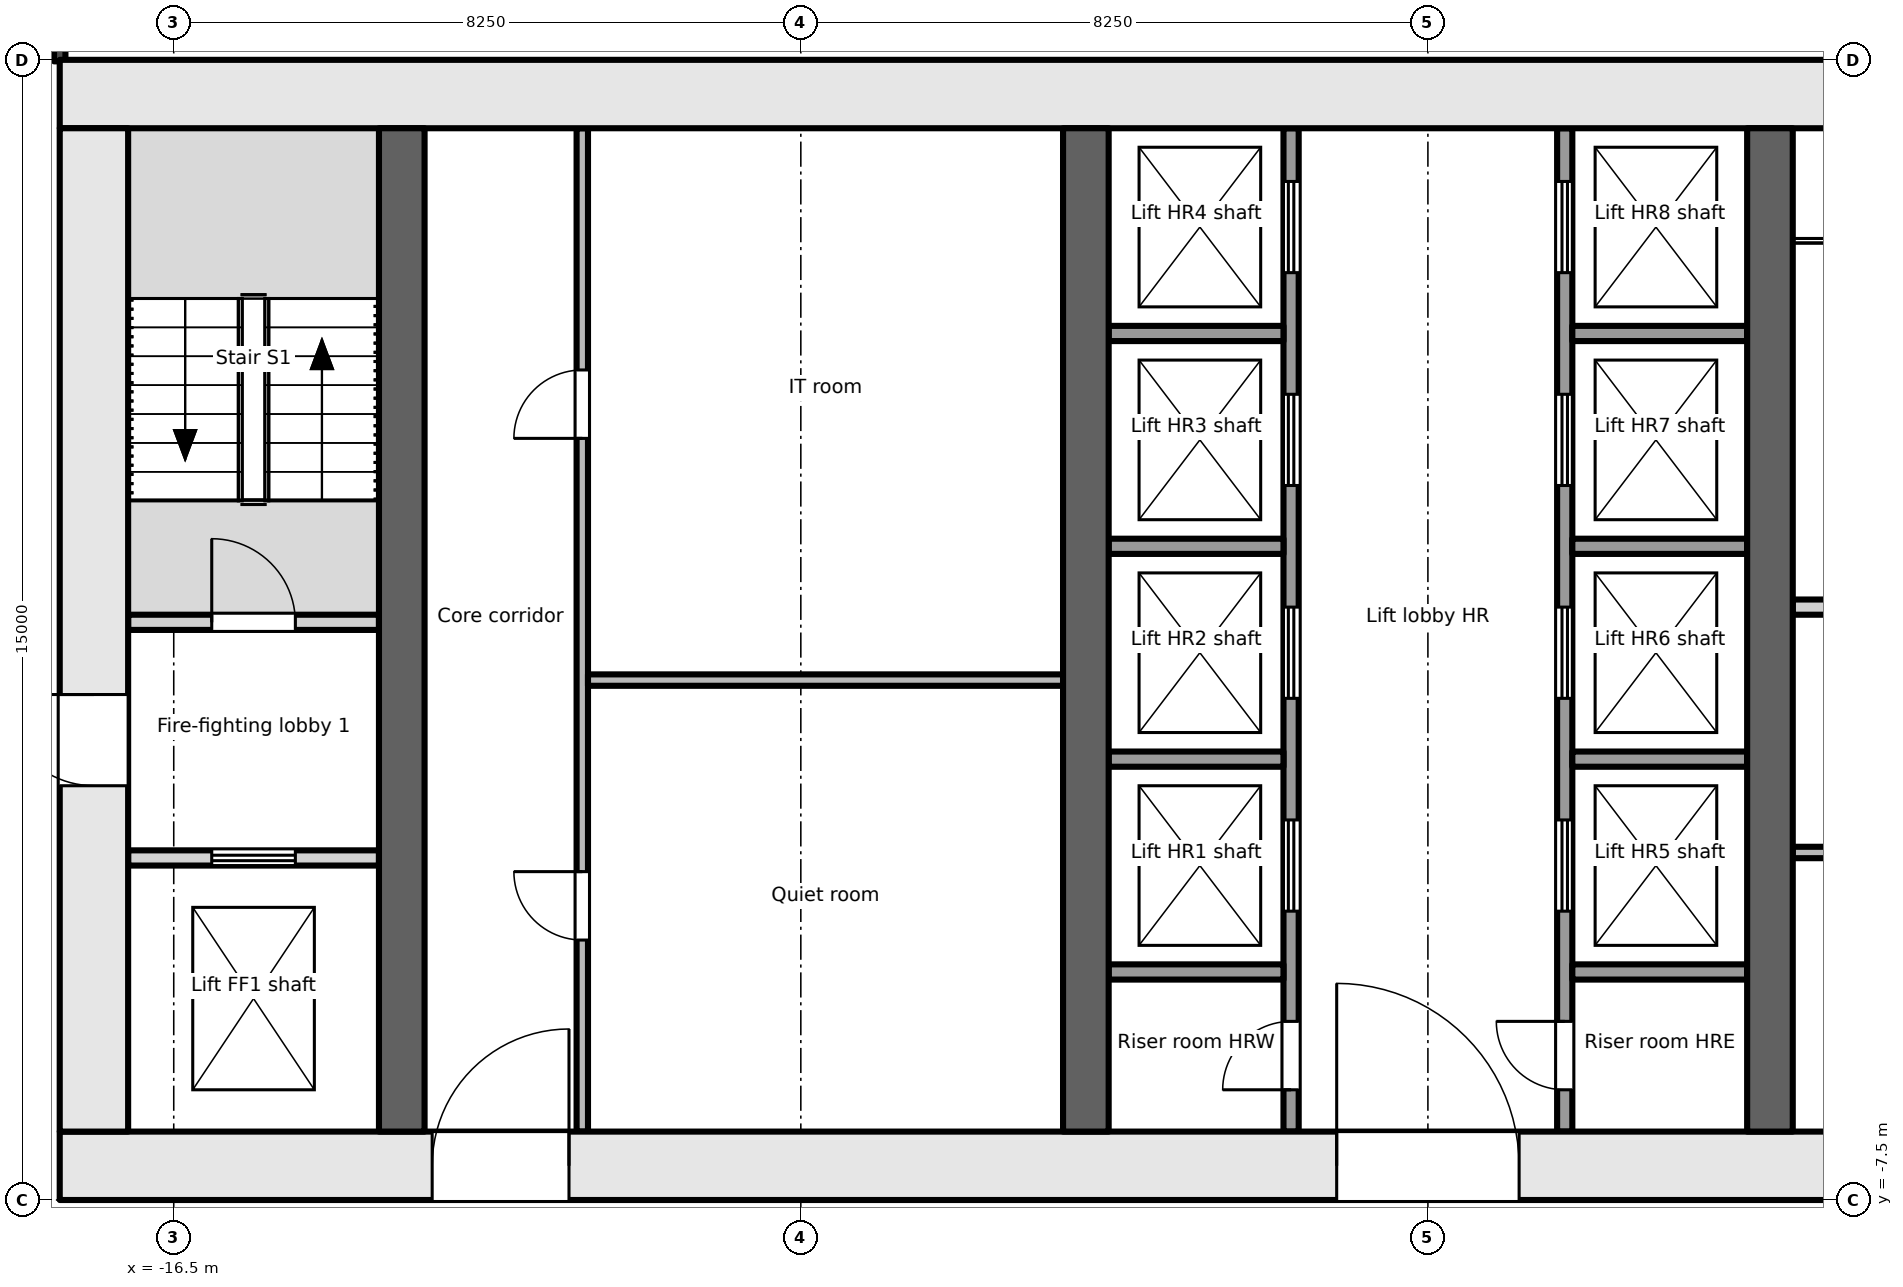
"""IFC4 building model, lengths in metres.
Left out: names, types, materials, properties, quantities, classifications, styles, units other than length and angle.
Written with IfcOpenShell. Run it as: python <this file> out.ifc"""

import sys

from ifc_helpers import new_model, si_unit, direction, frame, frame_2d, origin, place, context, subcontext, project, spatial, rectangle, extrude, element, fill, save


model = new_model("IFC4")
c1 = context("Model", 3, precision=1e-05, world=origin(), true_north=direction((0.0, 1.0)))
c2 = subcontext(c1, "Body", "Model", "MODEL_VIEW")
j1 = project(units=[si_unit("LENGTHUNIT", "METRE"), si_unit("PLANEANGLEUNIT", "RADIAN")], contexts=[c1])
p1 = place(None, origin())
s1 = spatial("IfcSite", under=j1, at=p1, CompositionType="ELEMENT")
p2 = place(p1, origin())
s2 = spatial("IfcBuilding", under=s1, at=p2, CompositionType="ELEMENT")
p3 = place(p2, frame((0.0, 0.0, 286.3)))
s3 = spatial("IfcBuildingStorey", under=s2, at=p3, CompositionType="ELEMENT", Elevation=286.3)
p4 = place(p3, frame((-18.0, -7.05, -0.2), z_axis=(0.0, 0.0, 1.0), x_axis=(1.0, 0.0, 0.0)))
e1 = element("IfcWall", 1, at=p4, inside=s3, PredefinedType="SHEAR", context=c2, shape_type="SweptSolid", body=[
    extrude(rectangle(XDim=36.0, YDim=0.9, at=frame_2d((18.0, 0.0))), origin(), (0.0, 0.0, 1.0), 6.0),
])
p5 = place(p4, frame((4.9, 0.0, 0.2)))
e2 = element("IfcOpeningElement", 2, at=p5, cuts=e1, PredefinedType="OPENING", context=c2, shape_type="SweptSolid", body=[
    extrude(rectangle(XDim=1.8, YDim=2.1, at=frame_2d((0.9, 1.05))), frame((0.0, 0.46, 0.0), z_axis=(0.0, -1.0, 0.0), x_axis=(1.0, 0.0, 0.0)), (0.0, 0.0, 1.0), 0.921),
])
p6 = place(p4, frame((16.8, 0.0, 0.2)))
e3 = element("IfcOpeningElement", 3, at=p6, cuts=e1, PredefinedType="OPENING", context=c2, shape_type="SweptSolid", body=[
    extrude(rectangle(XDim=2.4, YDim=2.1, at=frame_2d((1.2, 1.05))), frame((0.0, 0.46, 0.0), z_axis=(0.0, -1.0, 0.0), x_axis=(1.0, 0.0, 0.0)), (0.0, 0.0, 1.0), 0.921),
])
p7 = place(p4, frame((26.1, 0.0, 0.2)))
e4 = element("IfcOpeningElement", 4, at=p7, cuts=e1, PredefinedType="OPENING", context=c2, shape_type="SweptSolid", body=[
    extrude(rectangle(XDim=2.4, YDim=2.1, at=frame_2d((1.2, 1.05))), frame((0.0, 0.46, 0.0), z_axis=(0.0, -1.0, 0.0), x_axis=(1.0, 0.0, 0.0)), (0.0, 0.0, 1.0), 0.921),
])
p8 = place(p3, frame((-18.0, 7.05, -0.2), z_axis=(0.0, 0.0, 1.0), x_axis=(1.0, 0.0, 0.0)))
e5 = element("IfcWall", 5, at=p8, inside=s3, PredefinedType="SHEAR", context=c2, shape_type="SweptSolid", body=[
    extrude(rectangle(XDim=36.0, YDim=0.9, at=frame_2d((18.0, 0.0))), origin(), (0.0, 0.0, 1.0), 6.0),
])
p9 = place(p3, frame((-17.55, -6.6, -0.2), z_axis=(0.0, 0.0, 1.0), x_axis=(0.0, 1.0, 0.0)))
e6 = element("IfcWall", 6, at=p9, inside=s3, PredefinedType="SHEAR", context=c2, shape_type="SweptSolid", body=[
    extrude(rectangle(XDim=13.2, YDim=0.9, at=frame_2d((6.6, 0.0))), origin(), (0.0, 0.0, 1.0), 6.0),
])
p10 = place(p9, frame((4.55, 0.0, 0.2)))
e7 = element("IfcOpeningElement", 7, at=p10, cuts=e6, PredefinedType="OPENING", context=c2, shape_type="SweptSolid", body=[
    extrude(rectangle(XDim=1.2, YDim=2.1, at=frame_2d((0.6, 1.05))), frame((0.0, 0.46, 0.0), z_axis=(0.0, -1.0, 0.0), x_axis=(1.0, 0.0, 0.0)), (0.0, 0.0, 1.0), 0.921),
])
for number, where, z_axis, x_axis in (
    (8, (-13.5, -6.6, -0.2), (0.0, 0.0, 1.0), (0.0, 1.0, 0.0)),
    (9, (-4.5, -6.6, -0.2), (0.0, 0.0, 1.0), (0.0, 1.0, 0.0)),
    (10, (4.5, -6.6, -0.2), (0.0, 0.0, 1.0), (0.0, 1.0, 0.0)),
):
    element("IfcWall", number, at=place(p3, frame(where, z_axis=z_axis, x_axis=x_axis)), inside=s3, PredefinedType="SHEAR", context=c2, shape_type="SweptSolid", body=[
        extrude(rectangle(XDim=13.2, YDim=0.6, at=frame_2d((6.6, 0.0))), origin(), (0.0, 0.0, 1.0), 6.0),
    ])
p11 = place(p3, frame((-17.1, -3.0, 0.0), z_axis=(0.0, 0.0, 1.0), x_axis=(1.0, 0.0, 0.0)))
e11 = element("IfcWall", 11, at=p11, inside=s3, PredefinedType="PARTITIONING", context=c2, shape_type="SweptSolid", body=[
    extrude(rectangle(XDim=3.3, YDim=0.2, at=frame_2d((1.65, 0.0))), origin(), (0.0, 0.0, 1.0), 5.8),
])
p12 = place(p11, frame((1.1, 0.0, 0.0)))
e12 = element("IfcOpeningElement", 12, at=p12, cuts=e11, PredefinedType="OPENING", context=c2, shape_type="SweptSolid", body=[
    extrude(rectangle(XDim=1.1, YDim=2.1, at=frame_2d((0.55, 1.05))), frame((0.0, 0.111, 0.0), z_axis=(0.0, -1.0, 0.0), x_axis=(1.0, 0.0, 0.0)), (0.0, 0.0, 1.0), 0.221),
])
p13 = place(p3, frame((-17.1, 0.1, 0.0), z_axis=(0.0, 0.0, 1.0), x_axis=(1.0, 0.0, 0.0)))
e13 = element("IfcWall", 13, at=p13, inside=s3, PredefinedType="PARTITIONING", context=c2, shape_type="SweptSolid", body=[
    extrude(rectangle(XDim=3.3, YDim=0.2, at=frame_2d((1.65, 0.0))), origin(), (0.0, 0.0, 1.0), 5.8),
])
p14 = place(p13, frame((1.1, 0.0, 0.0)))
e14 = element("IfcOpeningElement", 14, at=p14, cuts=e13, PredefinedType="OPENING", context=c2, shape_type="SweptSolid", body=[
    extrude(rectangle(XDim=1.1, YDim=2.1, at=frame_2d((0.55, 1.05))), frame((0.0, 0.111, 0.0), z_axis=(0.0, -1.0, 0.0), x_axis=(1.0, 0.0, 0.0)), (0.0, 0.0, 1.0), 0.221),
])
p15 = place(p3, frame((-11.125, -6.6, 0.0), z_axis=(0.0, 0.0, 1.0), x_axis=(0.0, 1.0, 0.0)))
e15 = element("IfcWall", 15, at=p15, inside=s3, PredefinedType="PARTITIONING", context=c2, shape_type="SweptSolid", body=[
    extrude(rectangle(XDim=13.2, YDim=0.15, at=frame_2d((6.6, 0.0))), origin(), (0.0, 0.0, 1.0), 5.8),
])
p16 = place(p15, frame((2.52, 0.0, 0.0)))
e16 = element("IfcOpeningElement", 16, at=p16, cuts=e15, PredefinedType="OPENING", context=c2, shape_type="SweptSolid", body=[
    extrude(rectangle(XDim=0.9, YDim=2.1, at=frame_2d((0.45, 1.05))), frame((0.0, 0.085, 0.0), z_axis=(0.0, -1.0, 0.0), x_axis=(1.0, 0.0, 0.0)), (0.0, 0.0, 1.0), 0.171),
])
p17 = place(p15, frame((9.12, 0.0, 0.0)))
e17 = element("IfcOpeningElement", 17, at=p17, cuts=e15, PredefinedType="OPENING", context=c2, shape_type="SweptSolid", body=[
    extrude(rectangle(XDim=0.9, YDim=2.1, at=frame_2d((0.45, 1.05))), frame((0.0, 0.085, 0.0), z_axis=(0.0, -1.0, 0.0), x_axis=(1.0, 0.0, 0.0)), (0.0, 0.0, 1.0), 0.171),
])
p18 = place(p3, frame((-11.05, -0.66, 0.0), z_axis=(0.0, 0.0, 1.0), x_axis=(1.0, 0.0, 0.0)))
e18 = element("IfcWall", 18, at=p18, inside=s3, PredefinedType="PARTITIONING", context=c2, shape_type="SweptSolid", body=[
    extrude(rectangle(XDim=6.25, YDim=0.15, at=frame_2d((3.125, 0.0))), origin(), (0.0, 0.0, 1.0), 5.8),
])
p19 = place(p3, frame((-1.8, -6.6, 0.0), z_axis=(0.0, 0.0, 1.0), x_axis=(0.0, 1.0, 0.0)))
e19 = element("IfcWall", 19, at=p19, inside=s3, PredefinedType="PARTITIONING", context=c2, shape_type="SweptSolid", body=[
    extrude(rectangle(XDim=13.2, YDim=0.2, at=frame_2d((6.6, 0.0))), origin(), (0.0, 0.0, 1.0), 5.8),
])
p20 = place(p19, frame((0.55, 0.0, 0.0)))
e20 = element("IfcOpeningElement", 20, at=p20, cuts=e19, PredefinedType="OPENING", context=c2, shape_type="SweptSolid", body=[
    extrude(rectangle(XDim=0.9, YDim=2.1, at=frame_2d((0.45, 1.05))), frame((0.0, 0.111, 0.0), z_axis=(0.0, -1.0, 0.0), x_axis=(1.0, 0.0, 0.0)), (0.0, 0.0, 1.0), 0.221),
])
p21 = place(p19, frame((2.9, 0.0, 0.0)))
e21 = element("IfcOpeningElement", 21, at=p21, cuts=e19, PredefinedType="OPENING", context=c2, shape_type="SweptSolid", body=[
    extrude(rectangle(XDim=1.2, YDim=2.1, at=frame_2d((0.6, 1.05))), frame((0.0, 0.111, 0.0), z_axis=(0.0, -1.0, 0.0), x_axis=(1.0, 0.0, 0.0)), (0.0, 0.0, 1.0), 0.221),
])
p22 = place(p19, frame((5.7, 0.0, 0.0)))
e22 = element("IfcOpeningElement", 22, at=p22, cuts=e19, PredefinedType="OPENING", context=c2, shape_type="SweptSolid", body=[
    extrude(rectangle(XDim=1.2, YDim=2.1, at=frame_2d((0.6, 1.05))), frame((0.0, 0.111, 0.0), z_axis=(0.0, -1.0, 0.0), x_axis=(1.0, 0.0, 0.0)), (0.0, 0.0, 1.0), 0.221),
])
p23 = place(p19, frame((8.5, 0.0, 0.0)))
e23 = element("IfcOpeningElement", 23, at=p23, cuts=e19, PredefinedType="OPENING", context=c2, shape_type="SweptSolid", body=[
    extrude(rectangle(XDim=1.2, YDim=2.1, at=frame_2d((0.6, 1.05))), frame((0.0, 0.111, 0.0), z_axis=(0.0, -1.0, 0.0), x_axis=(1.0, 0.0, 0.0)), (0.0, 0.0, 1.0), 0.221),
])
p24 = place(p19, frame((11.3, 0.0, 0.0)))
e24 = element("IfcOpeningElement", 24, at=p24, cuts=e19, PredefinedType="OPENING", context=c2, shape_type="SweptSolid", body=[
    extrude(rectangle(XDim=1.2, YDim=2.1, at=frame_2d((0.6, 1.05))), frame((0.0, 0.111, 0.0), z_axis=(0.0, -1.0, 0.0), x_axis=(1.0, 0.0, 0.0)), (0.0, 0.0, 1.0), 0.221),
])
p25 = place(p3, frame((1.8, -6.6, 0.0), z_axis=(0.0, 0.0, 1.0), x_axis=(0.0, 1.0, 0.0)))
e25 = element("IfcWall", 25, at=p25, inside=s3, PredefinedType="PARTITIONING", context=c2, shape_type="SweptSolid", body=[
    extrude(rectangle(XDim=13.2, YDim=0.2, at=frame_2d((6.6, 0.0))), origin(), (0.0, 0.0, 1.0), 5.8),
])
p26 = place(p25, frame((0.55, 0.0, 0.0)))
e26 = element("IfcOpeningElement", 26, at=p26, cuts=e25, PredefinedType="OPENING", context=c2, shape_type="SweptSolid", body=[
    extrude(rectangle(XDim=0.9, YDim=2.1, at=frame_2d((0.45, 1.05))), frame((0.0, 0.111, 0.0), z_axis=(0.0, -1.0, 0.0), x_axis=(1.0, 0.0, 0.0)), (0.0, 0.0, 1.0), 0.221),
])
p27 = place(p25, frame((2.9, 0.0, 0.0)))
e27 = element("IfcOpeningElement", 27, at=p27, cuts=e25, PredefinedType="OPENING", context=c2, shape_type="SweptSolid", body=[
    extrude(rectangle(XDim=1.2, YDim=2.1, at=frame_2d((0.6, 1.05))), frame((0.0, 0.111, 0.0), z_axis=(0.0, -1.0, 0.0), x_axis=(1.0, 0.0, 0.0)), (0.0, 0.0, 1.0), 0.221),
])
p28 = place(p25, frame((5.7, 0.0, 0.0)))
e28 = element("IfcOpeningElement", 28, at=p28, cuts=e25, PredefinedType="OPENING", context=c2, shape_type="SweptSolid", body=[
    extrude(rectangle(XDim=1.2, YDim=2.1, at=frame_2d((0.6, 1.05))), frame((0.0, 0.111, 0.0), z_axis=(0.0, -1.0, 0.0), x_axis=(1.0, 0.0, 0.0)), (0.0, 0.0, 1.0), 0.221),
])
p29 = place(p25, frame((8.5, 0.0, 0.0)))
e29 = element("IfcOpeningElement", 29, at=p29, cuts=e25, PredefinedType="OPENING", context=c2, shape_type="SweptSolid", body=[
    extrude(rectangle(XDim=1.2, YDim=2.1, at=frame_2d((0.6, 1.05))), frame((0.0, 0.111, 0.0), z_axis=(0.0, -1.0, 0.0), x_axis=(1.0, 0.0, 0.0)), (0.0, 0.0, 1.0), 0.221),
])
p30 = place(p25, frame((11.3, 0.0, 0.0)))
e30 = element("IfcOpeningElement", 30, at=p30, cuts=e25, PredefinedType="OPENING", context=c2, shape_type="SweptSolid", body=[
    extrude(rectangle(XDim=1.2, YDim=2.1, at=frame_2d((0.6, 1.05))), frame((0.0, 0.111, 0.0), z_axis=(0.0, -1.0, 0.0), x_axis=(1.0, 0.0, 0.0)), (0.0, 0.0, 1.0), 0.221),
])
for number, where, z_axis, x_axis in (
    (31, (-4.2, -1.7, 0.0), (0.0, 0.0, 1.0), (1.0, 0.0, 0.0)),
    (32, (-4.2, 1.1, 0.0), (0.0, 0.0, 1.0), (1.0, 0.0, 0.0)),
    (33, (-4.2, 3.9, 0.0), (0.0, 0.0, 1.0), (1.0, 0.0, 0.0)),
    (34, (-4.2, -4.5, 0.0), (0.0, 0.0, 1.0), (1.0, 0.0, 0.0)),
    (35, (1.9, -1.7, 0.0), (0.0, 0.0, 1.0), (1.0, 0.0, 0.0)),
    (36, (1.9, 1.1, 0.0), (0.0, 0.0, 1.0), (1.0, 0.0, 0.0)),
    (37, (1.9, 3.9, 0.0), (0.0, 0.0, 1.0), (1.0, 0.0, 0.0)),
    (38, (1.9, -4.5, 0.0), (0.0, 0.0, 1.0), (1.0, 0.0, 0.0)),
):
    element("IfcWall", number, at=place(p3, frame(where, z_axis=z_axis, x_axis=x_axis)), inside=s3, PredefinedType="PARTITIONING", context=c2, shape_type="SweptSolid", body=[
        extrude(rectangle(XDim=2.3, YDim=0.2, at=frame_2d((1.15, 0.0))), origin(), (0.0, 0.0, 1.0), 5.8),
    ])
p31 = place(p3, frame((4.8, 0.3, 0.0), z_axis=(0.0, 0.0, 1.0), x_axis=(1.0, 0.0, 0.0)))
e39 = element("IfcWall", 39, at=p31, inside=s3, PredefinedType="PARTITIONING", context=c2, shape_type="SweptSolid", body=[
    extrude(rectangle(XDim=3.15, YDim=0.2, at=frame_2d((1.575, 0.0))), origin(), (0.0, 0.0, 1.0), 5.8),
])
p32 = place(p3, frame((4.8, -2.928, 0.0), z_axis=(0.0, 0.0, 1.0), x_axis=(1.0, 0.0, 0.0)))
e40 = element("IfcWall", 40, at=p32, inside=s3, PredefinedType="PARTITIONING", context=c2, shape_type="SweptSolid", body=[
    extrude(rectangle(XDim=3.15, YDim=0.15, at=frame_2d((1.575, 0.0))), origin(), (0.0, 0.0, 1.0), 5.8),
])
p33 = place(p3, frame((-18.0, 10.963, 0.0), z_axis=(0.0, 0.0, 1.0), x_axis=(0.0, -1.0, 0.0)))
e41 = element("IfcWall", 41, at=p33, inside=s3, PredefinedType="PARTITIONING", context=c2, shape_type="SweptSolid", body=[
    extrude(rectangle(XDim=3.483, YDim=0.15, at=frame_2d((1.741, 0.0))), origin(), (0.0, 0.0, 1.0), 5.8),
])
p34 = place(p12, origin())
e42 = element("IfcDoor", 42, at=p34, inside=s3, OperationType="DOUBLE_DOOR_SLIDING", PredefinedType="DOOR", context=c2, shape_type="SweptSolid", body=[
    extrude(rectangle(XDim=1.1, YDim=2.1, at=frame_2d((0.55, 1.05))), frame((0.0, 0.025, 0.0), z_axis=(0.0, -1.0, 0.0), x_axis=(1.0, 0.0, 0.0)), (0.0, 0.0, 1.0), 0.05),
])
fill(e12, e42)
p35 = place(p10, origin())
e43 = element("IfcDoor", 43, at=p35, inside=s3, OperationType="SINGLE_SWING_RIGHT", PredefinedType="DOOR", context=c2, shape_type="SweptSolid", body=[
    extrude(rectangle(XDim=1.2, YDim=2.1, at=frame_2d((0.6, 1.05))), frame((0.0, 0.025, 0.0), z_axis=(0.0, -1.0, 0.0), x_axis=(1.0, 0.0, 0.0)), (0.0, 0.0, 1.0), 0.05),
])
fill(e7, e43)
p36 = place(p14, origin())
e44 = element("IfcDoor", 44, at=p36, inside=s3, OperationType="SINGLE_SWING_LEFT", PredefinedType="DOOR", context=c2, shape_type="SweptSolid", body=[
    extrude(rectangle(XDim=1.1, YDim=2.1, at=frame_2d((0.55, 1.05))), frame((0.0, 0.025, 0.0), z_axis=(0.0, -1.0, 0.0), x_axis=(1.0, 0.0, 0.0)), (0.0, 0.0, 1.0), 0.05),
])
fill(e14, e44)
p37 = place(p16, origin())
e45 = element("IfcDoor", 45, at=p37, inside=s3, OperationType="SINGLE_SWING_RIGHT", PredefinedType="DOOR", context=c2, shape_type="SweptSolid", body=[
    extrude(rectangle(XDim=0.9, YDim=2.1, at=frame_2d((0.45, 1.05))), frame((0.0, 0.025, 0.0), z_axis=(0.0, -1.0, 0.0), x_axis=(1.0, 0.0, 0.0)), (0.0, 0.0, 1.0), 0.05),
])
fill(e16, e45)
p38 = place(p17, origin())
e46 = element("IfcDoor", 46, at=p38, inside=s3, OperationType="SINGLE_SWING_LEFT", PredefinedType="DOOR", context=c2, shape_type="SweptSolid", body=[
    extrude(rectangle(XDim=0.9, YDim=2.1, at=frame_2d((0.45, 1.05))), frame((0.0, 0.025, 0.0), z_axis=(0.0, -1.0, 0.0), x_axis=(1.0, 0.0, 0.0)), (0.0, 0.0, 1.0), 0.05),
])
fill(e17, e46)
p39 = place(p5, origin())
e47 = element("IfcDoor", 47, at=p39, inside=s3, OperationType="SINGLE_SWING_RIGHT", PredefinedType="DOOR", context=c2, shape_type="SweptSolid", body=[
    extrude(rectangle(XDim=1.8, YDim=2.1, at=frame_2d((0.9, 1.05))), frame((0.0, 0.025, 0.0), z_axis=(0.0, -1.0, 0.0), x_axis=(1.0, 0.0, 0.0)), (0.0, 0.0, 1.0), 0.05),
])
fill(e2, e47)
p40 = place(p20, origin())
e48 = element("IfcDoor", 48, at=p40, inside=s3, OperationType="SINGLE_SWING_LEFT", PredefinedType="DOOR", context=c2, shape_type="SweptSolid", body=[
    extrude(rectangle(XDim=0.9, YDim=2.1, at=frame_2d((0.45, 1.05))), frame((0.0, 0.025, 0.0), z_axis=(0.0, -1.0, 0.0), x_axis=(1.0, 0.0, 0.0)), (0.0, 0.0, 1.0), 0.05),
])
fill(e20, e48)
p41 = place(p21, origin())
e49 = element("IfcDoor", 49, at=p41, inside=s3, OperationType="DOUBLE_DOOR_SLIDING", PredefinedType="DOOR", context=c2, shape_type="SweptSolid", body=[
    extrude(rectangle(XDim=1.2, YDim=2.1, at=frame_2d((0.6, 1.05))), frame((0.0, 0.025, 0.0), z_axis=(0.0, -1.0, 0.0), x_axis=(1.0, 0.0, 0.0)), (0.0, 0.0, 1.0), 0.05),
])
fill(e21, e49)
p42 = place(p22, origin())
e50 = element("IfcDoor", 50, at=p42, inside=s3, OperationType="DOUBLE_DOOR_SLIDING", PredefinedType="DOOR", context=c2, shape_type="SweptSolid", body=[
    extrude(rectangle(XDim=1.2, YDim=2.1, at=frame_2d((0.6, 1.05))), frame((0.0, 0.025, 0.0), z_axis=(0.0, -1.0, 0.0), x_axis=(1.0, 0.0, 0.0)), (0.0, 0.0, 1.0), 0.05),
])
fill(e22, e50)
p43 = place(p23, origin())
e51 = element("IfcDoor", 51, at=p43, inside=s3, OperationType="DOUBLE_DOOR_SLIDING", PredefinedType="DOOR", context=c2, shape_type="SweptSolid", body=[
    extrude(rectangle(XDim=1.2, YDim=2.1, at=frame_2d((0.6, 1.05))), frame((0.0, 0.025, 0.0), z_axis=(0.0, -1.0, 0.0), x_axis=(1.0, 0.0, 0.0)), (0.0, 0.0, 1.0), 0.05),
])
fill(e23, e51)
p44 = place(p24, origin())
e52 = element("IfcDoor", 52, at=p44, inside=s3, OperationType="DOUBLE_DOOR_SLIDING", PredefinedType="DOOR", context=c2, shape_type="SweptSolid", body=[
    extrude(rectangle(XDim=1.2, YDim=2.1, at=frame_2d((0.6, 1.05))), frame((0.0, 0.025, 0.0), z_axis=(0.0, -1.0, 0.0), x_axis=(1.0, 0.0, 0.0)), (0.0, 0.0, 1.0), 0.05),
])
fill(e24, e52)
p45 = place(p26, origin())
e53 = element("IfcDoor", 53, at=p45, inside=s3, OperationType="SINGLE_SWING_RIGHT", PredefinedType="DOOR", context=c2, shape_type="SweptSolid", body=[
    extrude(rectangle(XDim=0.9, YDim=2.1, at=frame_2d((0.45, 1.05))), frame((0.0, 0.025, 0.0), z_axis=(0.0, -1.0, 0.0), x_axis=(1.0, 0.0, 0.0)), (0.0, 0.0, 1.0), 0.05),
])
fill(e26, e53)
p46 = place(p27, origin())
e54 = element("IfcDoor", 54, at=p46, inside=s3, OperationType="DOUBLE_DOOR_SLIDING", PredefinedType="DOOR", context=c2, shape_type="SweptSolid", body=[
    extrude(rectangle(XDim=1.2, YDim=2.1, at=frame_2d((0.6, 1.05))), frame((0.0, 0.025, 0.0), z_axis=(0.0, -1.0, 0.0), x_axis=(1.0, 0.0, 0.0)), (0.0, 0.0, 1.0), 0.05),
])
fill(e27, e54)
p47 = place(p28, origin())
e55 = element("IfcDoor", 55, at=p47, inside=s3, OperationType="DOUBLE_DOOR_SLIDING", PredefinedType="DOOR", context=c2, shape_type="SweptSolid", body=[
    extrude(rectangle(XDim=1.2, YDim=2.1, at=frame_2d((0.6, 1.05))), frame((0.0, 0.025, 0.0), z_axis=(0.0, -1.0, 0.0), x_axis=(1.0, 0.0, 0.0)), (0.0, 0.0, 1.0), 0.05),
])
fill(e28, e55)
p48 = place(p29, origin())
e56 = element("IfcDoor", 56, at=p48, inside=s3, OperationType="DOUBLE_DOOR_SLIDING", PredefinedType="DOOR", context=c2, shape_type="SweptSolid", body=[
    extrude(rectangle(XDim=1.2, YDim=2.1, at=frame_2d((0.6, 1.05))), frame((0.0, 0.025, 0.0), z_axis=(0.0, -1.0, 0.0), x_axis=(1.0, 0.0, 0.0)), (0.0, 0.0, 1.0), 0.05),
])
fill(e29, e56)
p49 = place(p30, origin())
e57 = element("IfcDoor", 57, at=p49, inside=s3, OperationType="DOUBLE_DOOR_SLIDING", PredefinedType="DOOR", context=c2, shape_type="SweptSolid", body=[
    extrude(rectangle(XDim=1.2, YDim=2.1, at=frame_2d((0.6, 1.05))), frame((0.0, 0.025, 0.0), z_axis=(0.0, -1.0, 0.0), x_axis=(1.0, 0.0, 0.0)), (0.0, 0.0, 1.0), 0.05),
])
fill(e30, e57)
p50 = place(p6, origin())
e58 = element("IfcDoor", 58, at=p50, inside=s3, OperationType="DOUBLE_DOOR_DOUBLE_SWING", PredefinedType="DOOR", context=c2, shape_type="SweptSolid", body=[
    extrude(rectangle(XDim=2.4, YDim=2.1, at=frame_2d((1.2, 1.05))), frame((0.0, 0.025, 0.0), z_axis=(0.0, -1.0, 0.0), x_axis=(1.0, 0.0, 0.0)), (0.0, 0.0, 1.0), 0.05),
])
fill(e3, e58)
save(model, sys.argv[1])
